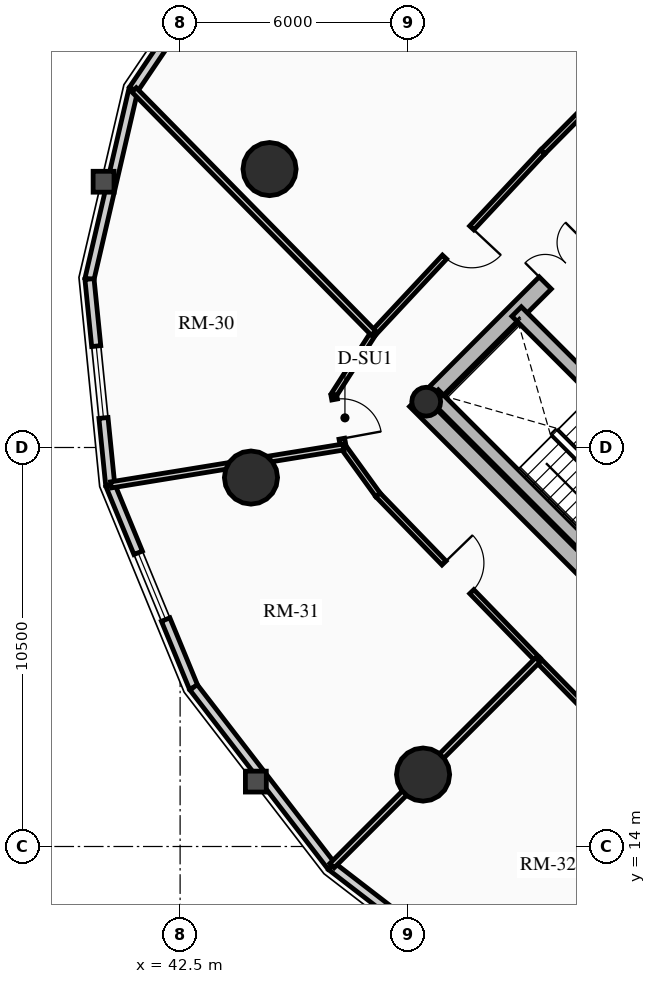
"""IFC4 building model, lengths in metres.
Left out: names, types, materials, properties, quantities, classifications, styles, units other than length and angle.
Written with IfcOpenShell. Run it as: python <this file> out.ifc"""

import sys

from ifc_helpers import new_model, si_unit, direction, frame, frame_2d, origin, origin_2d, place, context, subcontext, project, spatial, rectangle, circle, hollow_circle, extrude, source, transform, mapped, element, fill, save


model = new_model("IFC4")
c1 = context("Model", 3, precision=1e-05, world=origin(), true_north=direction((0.0, 1.0)))
c2 = subcontext(c1, "Body", "Model", "MODEL_VIEW")
j1 = project(units=[si_unit("LENGTHUNIT", "METRE"), si_unit("PLANEANGLEUNIT", "RADIAN")], contexts=[c1])
p1 = place(None, origin())
s1 = spatial("IfcSite", under=j1, at=p1, CompositionType="ELEMENT")
p2 = place(p1, origin())
s2 = spatial("IfcBuilding", under=s1, at=p2, CompositionType="ELEMENT")
p3 = place(p2, frame((0.0, 0.0, 78.88)))
s3 = spatial("IfcBuildingStorey", under=s2, at=p3, CompositionType="ELEMENT", Elevation=78.88)
p4 = place(p3, frame((58.737, 15.697, 0.0), z_axis=(0.0, 0.0, 1.0), x_axis=(-0.707106781187, 0.707106781187, 0.0)))
e1 = element("IfcWall", 1, at=p4, inside=s3, PredefinedType="SHEAR", context=c2, shape_type="SweptSolid", body=[
    extrude(rectangle(XDim=14.2, YDim=0.45, at=frame_2d((7.1, 0.0))), origin(), (0.0, 0.0, 1.0), 2.91),
])
p5 = place(p3, frame((48.856, 25.578, 0.0), z_axis=(0.0, 0.0, 1.0), x_axis=(0.707106781187, 0.707106781187, 0.0)))
e2 = element("IfcWall", 2, at=p5, inside=s3, PredefinedType="SHEAR", context=c2, shape_type="SweptSolid", body=[
    extrude(rectangle(XDim=10.7, YDim=0.45, at=frame_2d((5.35, 0.0))), origin(), (0.0, 0.0, 1.0), 2.91),
])
m1 = source(origin(), c2, "Body", "SweptSolid", [
    extrude(rectangle(XDim=1.5, YDim=2.02, at=frame_2d((0.75, 1.01))), frame((0.0, 0.235, 0.0), z_axis=(0.0, -1.0, 0.0), x_axis=(1.0, 0.0, 0.0)), (0.0, 0.0, 1.0), 0.47),
])
p6 = place(p5, frame((4.6, 0.0, 0.0)))
e3 = element("IfcOpeningElement", 3, at=p6, cuts=e2, PredefinedType="OPENING", context=c2, shape_type="MappedRepresentation", body=[
    mapped(m1, transform((0.0, 0.0, 0.0), x_axis=(1.0, 0.0, 0.0), y_axis=(0.0, 1.0, 0.0), z_axis=(0.0, 0.0, 1.0), scale=1.0)),
])
p7 = place(p3, frame((61.078, 18.355, 0.0), z_axis=(0.0, 0.0, 1.0), x_axis=(-0.707106781187, 0.707106781187, 0.0)))
e4 = element("IfcWall", 4, at=p7, inside=s3, PredefinedType="SHEAR", context=c2, shape_type="SweptSolid", body=[
    extrude(rectangle(XDim=13.75, YDim=0.35, at=frame_2d((6.875, 0.0))), origin(), (0.0, 0.0, 1.0), 2.91),
])
m2 = source(origin(), c2, "Body", "SweptSolid", [
    extrude(rectangle(XDim=1.1, YDim=2.015, at=frame_2d((0.55, 1.007))), frame((0.0, 0.185, 0.0), z_axis=(0.0, -1.0, 0.0), x_axis=(1.0, 0.0, 0.0)), (0.0, 0.0, 1.0), 0.37),
])
p8 = place(p7, frame((4.875, 0.0, 0.0)))
e5 = element("IfcOpeningElement", 5, at=p8, cuts=e4, PredefinedType="OPENING", context=c2, shape_type="MappedRepresentation", body=[
    mapped(m2, transform((0.0, 0.0, 0.0), x_axis=(1.0, 0.0, 0.0), y_axis=(0.0, 1.0, 0.0), z_axis=(0.0, 0.0, 1.0), scale=1.0)),
])
m3 = source(origin(), c2, "Body", "SweptSolid", [
    extrude(rectangle(XDim=1.15, YDim=2.02, at=frame_2d((0.575, 1.01))), frame((0.0, 0.185, 0.0), z_axis=(0.0, -1.0, 0.0), x_axis=(1.0, 0.0, 0.0)), (0.0, 0.0, 1.0), 0.37),
])
p9 = place(p7, frame((7.295, 0.0, 0.0)))
e6 = element("IfcOpeningElement", 6, at=p9, cuts=e4, PredefinedType="OPENING", context=c2, shape_type="MappedRepresentation", body=[
    mapped(m3, transform((0.0, 0.0, 0.0), x_axis=(1.0, 0.0, 0.0), y_axis=(0.0, 1.0, 0.0), z_axis=(0.0, 0.0, 1.0), scale=1.0)),
])
p10 = place(p3, frame((53.922, 21.141, 0.0), z_axis=(0.0, 0.0, 1.0), x_axis=(-0.707088616009, 0.707124945897, 0.0)))
e7 = element("IfcWall", 7, at=p10, inside=s3, PredefinedType="SHEAR", context=c2, shape_type="SweptSolid", body=[
    extrude(rectangle(XDim=6.72, YDim=0.35, at=frame_2d((3.36, 0.0))), origin(), (0.0, 0.0, 1.0), 2.91),
])
p11 = place(p3, frame((48.976, 25.706, 0.0), z_axis=(0.0, 0.0, 1.0), x_axis=(0.707106781187, 0.707106781187, 0.0)))
e8 = element("IfcColumn", 8, at=p11, inside=s3, PredefinedType="COLUMN", context=c2, shape_type="SweptSolid", body=[
    extrude(hollow_circle(Radius=0.38, WallThickness=0.032, at=origin_2d()), origin(), (0.0, 0.0, 1.0), 2.91),
])
for number, where, z_axis, x_axis in (
    (9, (44.854, 31.827, 0.0), (0.0, 0.0, 1.0), (1.0, 0.0, 0.0)),
    (10, (44.365, 23.709, 0.0), (0.0, 0.0, 1.0), (1.0, 0.0, 0.0)),
    (11, (48.893, 15.893, 0.0), (0.0, 0.0, 1.0), (1.0, 0.0, 0.0)),
):
    element("IfcColumn", number, at=place(p3, frame(where, z_axis=z_axis, x_axis=x_axis)), inside=s3, PredefinedType="USERDEFINED", context=c2, shape_type="SweptSolid", body=[
        extrude(circle(Radius=0.7, at=origin_2d()), origin(), (0.0, 0.0, 1.0), 2.91),
    ])
p12 = place(p3, frame((41.271, 33.92, 0.0), z_axis=(0.0, 0.0, 1.0), x_axis=(0.559572880421, 0.828781148131, 0.0)))
e12 = element("IfcWall", 12, at=p12, inside=s3, PredefinedType="SOLIDWALL", context=c2, shape_type="SweptSolid", body=[
    extrude(rectangle(XDim=4.905, YDim=0.24, at=frame_2d((2.452, 0.0))), origin(), (0.0, 0.0, 1.0), 2.179),
])
m4 = source(origin(), c2, "Body", "SweptSolid", [
    extrude(rectangle(XDim=1.9, YDim=1.35, at=frame_2d((0.95, 0.675))), frame((0.0, 0.13, 0.0), z_axis=(0.0, -1.0, 0.0), x_axis=(1.0, 0.0, 0.0)), (0.0, 0.0, 1.0), 0.26),
])
p13 = place(p12, frame((1.502, 0.0, 0.65)))
e13 = element("IfcOpeningElement", 13, at=p13, cuts=e12, PredefinedType="OPENING", context=c2, shape_type="MappedRepresentation", body=[
    mapped(m4, transform((0.0, 0.0, 0.0), x_axis=(1.0, 0.0, 0.0), y_axis=(0.0, 1.0, 0.0), z_axis=(0.0, 0.0, 1.0), scale=1.0)),
])
p14 = place(p3, frame((40.115, 28.933, 0.0), z_axis=(0.0, 0.0, 1.0), x_axis=(0.225834725257, 0.974165631126, 0.0)))
e14 = element("IfcWall", 14, at=p14, inside=s3, PredefinedType="SOLIDWALL", context=c2, shape_type="SweptSolid", body=[
    extrude(rectangle(XDim=5.119, YDim=0.24, at=frame_2d((2.56, 0.0))), origin(), (0.0, 0.0, 1.0), 2.179),
])
p15 = place(p3, frame((40.661, 23.513, 0.0), z_axis=(0.0, 0.0, 1.0), x_axis=(-0.10015591906, 0.994971754311, 0.0)))
e15 = element("IfcWall", 15, at=p15, inside=s3, PredefinedType="SOLIDWALL", context=c2, shape_type="SweptSolid", body=[
    extrude(rectangle(XDim=5.448, YDim=0.24, at=frame_2d((2.724, 0.0))), origin(), (0.0, 0.0, 1.0), 2.179),
])
p16 = place(p15, frame((1.774, 0.0, 0.65)))
e16 = element("IfcOpeningElement", 16, at=p16, cuts=e15, PredefinedType="OPENING", context=c2, shape_type="MappedRepresentation", body=[
    mapped(m4, transform((0.0, 0.0, 0.0), x_axis=(1.0, 0.0, 0.0), y_axis=(0.0, 1.0, 0.0), z_axis=(0.0, 0.0, 1.0), scale=1.0)),
])
p17 = place(p3, frame((42.855, 18.189, 0.0), z_axis=(0.0, 0.0, 1.0), x_axis=(-0.381027003055, 0.924563909604, 0.0)))
e17 = element("IfcWall", 17, at=p17, inside=s3, PredefinedType="SOLIDWALL", context=c2, shape_type="SweptSolid", body=[
    extrude(rectangle(XDim=5.758, YDim=0.24, at=frame_2d((2.879, 0.0))), origin(), (0.0, 0.0, 1.0), 2.179),
])
p18 = place(p17, frame((1.929, 0.0, 0.65)))
e18 = element("IfcOpeningElement", 18, at=p18, cuts=e17, PredefinedType="OPENING", context=c2, shape_type="MappedRepresentation", body=[
    mapped(m4, transform((0.0, 0.0, 0.0), x_axis=(1.0, 0.0, 0.0), y_axis=(0.0, 1.0, 0.0), z_axis=(0.0, 0.0, 1.0), scale=1.0)),
])
p19 = place(p3, frame((46.483, 13.483, 0.0), z_axis=(0.0, 0.0, 1.0), x_axis=(-0.61054437102, 0.791982052206, 0.0)))
e19 = element("IfcWall", 19, at=p19, inside=s3, PredefinedType="SOLIDWALL", context=c2, shape_type="SweptSolid", body=[
    extrude(rectangle(XDim=5.942, YDim=0.24, at=frame_2d((2.971, 0.0))), origin(), (0.0, 0.0, 1.0), 2.179),
])
p20 = place(p3, frame((51.189, 9.855, 0.0), z_axis=(0.0, 0.0, 1.0), x_axis=(-0.791982052206, 0.61054437102, 0.0)))
e20 = element("IfcWall", 20, at=p20, inside=s3, PredefinedType="SOLIDWALL", context=c2, shape_type="SweptSolid", body=[
    extrude(rectangle(XDim=5.942, YDim=0.24, at=frame_2d((2.971, 0.0))), origin(), (0.0, 0.0, 1.0), 2.179),
])
p21 = place(p20, frame((2.021, 0.0, 0.65)))
e21 = element("IfcOpeningElement", 21, at=p21, cuts=e20, PredefinedType="OPENING", context=c2, shape_type="MappedRepresentation", body=[
    mapped(m4, transform((0.0, 0.0, 0.0), x_axis=(1.0, 0.0, 0.0), y_axis=(0.0, 1.0, 0.0), z_axis=(0.0, 0.0, 1.0), scale=1.0)),
])
p22 = place(p3, frame((54.427, 34.683, 0.0), z_axis=(0.0, 0.0, 1.0), x_axis=(-0.704178989986, -0.710022499687, 0.0)))
e22 = element("IfcWall", 22, at=p22, inside=s3, PredefinedType="PARTITIONING", context=c2, shape_type="SweptSolid", body=[
    extrude(rectangle(XDim=3.384, YDim=0.15, at=frame_2d((1.692, 0.0))), origin(), (0.0, 0.0, 1.0), 2.225),
])
p23 = place(p3, frame((52.043, 32.28, 0.0), z_axis=(0.0, 0.0, 1.0), x_axis=(-0.682606081633, -0.730786519661, 0.0)))
e23 = element("IfcWall", 23, at=p23, inside=s3, PredefinedType="PARTITIONING", context=c2, shape_type="SweptSolid", body=[
    extrude(rectangle(XDim=6.527, YDim=0.15, at=frame_2d((3.263, 0.0))), origin(), (0.0, 0.0, 1.0), 2.225),
])
m5 = source(origin(), c2, "Body", "SweptSolid", [
    extrude(rectangle(XDim=1.05, YDim=2.015, at=frame_2d((0.525, 1.007))), frame((0.0, 0.085, 0.0), z_axis=(0.0, -1.0, 0.0), x_axis=(1.0, 0.0, 0.0)), (0.0, 0.0, 1.0), 0.17),
])
p24 = place(p23, frame((2.738, 0.0, 0.0)))
e24 = element("IfcOpeningElement", 24, at=p24, cuts=e23, PredefinedType="OPENING", context=c2, shape_type="MappedRepresentation", body=[
    mapped(m5, transform((0.0, 0.0, 0.0), x_axis=(1.0, 0.0, 0.0), y_axis=(0.0, 1.0, 0.0), z_axis=(0.0, 0.0, 1.0), scale=1.0)),
])
p25 = place(p3, frame((47.588, 27.51, 0.0), z_axis=(0.0, 0.0, 1.0), x_axis=(-0.540202619347, -0.841534984449, 0.0)))
e25 = element("IfcWall", 25, at=p25, inside=s3, PredefinedType="PARTITIONING", context=c2, shape_type="SweptSolid", body=[
    extrude(rectangle(XDim=1.935, YDim=0.15, at=frame_2d((0.967, 0.0))), origin(), (0.0, 0.0, 1.0), 2.225),
])
p26 = place(p3, frame((46.543, 25.882, 0.0), z_axis=(0.0, 0.0, 1.0), x_axis=(0.181153502579, -0.983454832976, 0.0)))
e26 = element("IfcWall", 26, at=p26, inside=s3, PredefinedType="PARTITIONING", context=c2, shape_type="SweptSolid", body=[
    extrude(rectangle(XDim=1.392, YDim=0.15, at=frame_2d((0.696, 0.0))), origin(), (0.0, 0.0, 1.0), 2.225),
])
p27 = place(p26, frame((0.12, 0.0, 0.0)))
e27 = element("IfcOpeningElement", 27, at=p27, cuts=e26, PredefinedType="OPENING", context=c2, shape_type="MappedRepresentation", body=[
    mapped(m5, transform((0.0, 0.0, 0.0), x_axis=(1.0, 0.0, 0.0), y_axis=(0.0, 1.0, 0.0), z_axis=(0.0, 0.0, 1.0), scale=1.0)),
])
p28 = place(p3, frame((46.795, 24.513, 0.0), z_axis=(0.0, 0.0, 1.0), x_axis=(0.585628197524, -0.810579801294, 0.0)))
e28 = element("IfcWall", 28, at=p28, inside=s3, PredefinedType="PARTITIONING", context=c2, shape_type="SweptSolid", body=[
    extrude(rectangle(XDim=1.554, YDim=0.15, at=frame_2d((0.777, 0.0))), origin(), (0.0, 0.0, 1.0), 2.225),
])
p29 = place(p3, frame((47.706, 23.253, 0.0), z_axis=(0.0, 0.0, 1.0), x_axis=(0.696179266346, -0.717867974707, 0.0)))
e29 = element("IfcWall", 29, at=p29, inside=s3, PredefinedType="PARTITIONING", context=c2, shape_type="SweptSolid", body=[
    extrude(rectangle(XDim=6.045, YDim=0.15, at=frame_2d((3.022, 0.0))), origin(), (0.0, 0.0, 1.0), 2.655),
])
p30 = place(p29, frame((2.497, 0.0, 0.0)))
e30 = element("IfcOpeningElement", 30, at=p30, cuts=e29, PredefinedType="OPENING", context=c2, shape_type="MappedRepresentation", body=[
    mapped(m5, transform((0.0, 0.0, 0.0), x_axis=(1.0, 0.0, 0.0), y_axis=(0.0, 1.0, 0.0), z_axis=(0.0, 0.0, 1.0), scale=1.0)),
])
p31 = place(p3, frame((51.914, 18.914, 0.0), z_axis=(0.0, 0.0, 1.0), x_axis=(0.699999313799, -0.714143515465, 0.0)))
e31 = element("IfcWall", 31, at=p31, inside=s3, PredefinedType="PARTITIONING", context=c2, shape_type="SweptSolid", body=[
    extrude(rectangle(XDim=6.162, YDim=0.15, at=frame_2d((3.081, 0.0))), origin(), (0.0, 0.0, 1.0), 2.225),
])
p32 = place(p3, frame((54.427, 34.683, 0.0), z_axis=(0.0, 0.0, 1.0), x_axis=(-0.72454072322, 0.689231993161, 0.0)))
e32 = element("IfcWall", 32, at=p32, inside=s3, PredefinedType="PARTITIONING", context=c2, shape_type="SweptSolid", body=[
    extrude(rectangle(XDim=8.747, YDim=0.16, at=frame_2d((4.374, 0.0))), origin(), (0.0, 0.0, 1.0), 2.179),
])
p33 = place(p3, frame((47.588, 27.51, 0.0), z_axis=(0.0, 0.0, 1.0), x_axis=(-0.701457073903, 0.712711704318, 0.0)))
e33 = element("IfcWall", 33, at=p33, inside=s3, PredefinedType="PARTITIONING", context=c2, shape_type="SweptSolid", body=[
    extrude(rectangle(XDim=8.981, YDim=0.16, at=frame_2d((4.49, 0.0))), origin(), (0.0, 0.0, 1.0), 2.179),
])
p34 = place(p3, frame((46.795, 24.513, 0.0), z_axis=(0.0, 0.0, 1.0), x_axis=(-0.986966109862, -0.160928238618, 0.0)))
e34 = element("IfcWall", 34, at=p34, inside=s3, PredefinedType="PARTITIONING", context=c2, shape_type="SweptSolid", body=[
    extrude(rectangle(XDim=6.196, YDim=0.16, at=frame_2d((3.098, 0.0))), origin(), (0.0, 0.0, 1.0), 2.179),
])
p35 = place(p3, frame((51.914, 18.914, 0.0), z_axis=(0.0, 0.0, 1.0), x_axis=(-0.707106781187, -0.707106781187, 0.0)))
e35 = element("IfcWall", 35, at=p35, inside=s3, PredefinedType="PARTITIONING", context=c2, shape_type="SweptSolid", body=[
    extrude(rectangle(XDim=7.661, YDim=0.16, at=frame_2d((3.831, 0.0))), origin(), (0.0, 0.0, 1.0), 2.179),
])
m6 = source(origin(), c2, "Body", "SweptSolid", [
    extrude(rectangle(XDim=1.9, YDim=1.35, at=frame_2d((0.95, 0.675))), frame((0.0, 0.03, 0.0), z_axis=(0.0, -1.0, 0.0), x_axis=(1.0, 0.0, 0.0)), (0.0, 0.0, 1.0), 0.06),
])
p36 = place(p16, origin())
e36 = element("IfcWindow", 36, at=p36, inside=s3, PartitioningType="DOUBLE_PANEL_VERTICAL", PredefinedType="WINDOW", context=c2, shape_type="MappedRepresentation", body=[
    mapped(m6, transform((0.0, 0.0, 0.0), x_axis=(1.0, 0.0, 0.0), y_axis=(0.0, 1.0, 0.0), z_axis=(0.0, 0.0, 1.0), scale=1.0)),
])
fill(e16, e36)
p37 = place(p18, origin())
e37 = element("IfcWindow", 37, at=p37, inside=s3, PartitioningType="DOUBLE_PANEL_VERTICAL", PredefinedType="WINDOW", context=c2, shape_type="MappedRepresentation", body=[
    mapped(m6, transform((0.0, 0.0, 0.0), x_axis=(1.0, 0.0, 0.0), y_axis=(0.0, 1.0, 0.0), z_axis=(0.0, 0.0, 1.0), scale=1.0)),
])
fill(e18, e37)
m7 = source(origin(), c2, "Body", "SweptSolid", [
    extrude(rectangle(XDim=1.5, YDim=2.02, at=frame_2d((0.75, 1.01))), frame((0.0, 0.025, 0.0), z_axis=(0.0, -1.0, 0.0), x_axis=(1.0, 0.0, 0.0)), (0.0, 0.0, 1.0), 0.05),
])
p38 = place(p6, origin())
e38 = element("IfcDoor", 38, at=p38, inside=s3, OperationType="DOUBLE_DOOR_SINGLE_SWING", PredefinedType="DOOR", context=c2, shape_type="MappedRepresentation", body=[
    mapped(m7, transform((0.0, 0.0, 0.0), x_axis=(1.0, 0.0, 0.0), y_axis=(0.0, 1.0, 0.0), z_axis=(0.0, 0.0, 1.0), scale=1.0)),
])
fill(e3, e38)
m8 = source(origin(), c2, "Body", "SweptSolid", [
    extrude(rectangle(XDim=1.05, YDim=2.015, at=frame_2d((0.525, 1.007))), frame((0.0, 0.025, 0.0), z_axis=(0.0, -1.0, 0.0), x_axis=(1.0, 0.0, 0.0)), (0.0, 0.0, 1.0), 0.05),
])
p39 = place(p24, origin())
e39 = element("IfcDoor", 39, at=p39, inside=s3, OperationType="SINGLE_SWING_LEFT", PredefinedType="DOOR", context=c2, shape_type="MappedRepresentation", body=[
    mapped(m8, transform((0.0, 0.0, 0.0), x_axis=(1.0, 0.0, 0.0), y_axis=(0.0, 1.0, 0.0), z_axis=(0.0, 0.0, 1.0), scale=1.0)),
])
fill(e24, e39)
p40 = place(p27, origin())
e40 = element("IfcDoor", 40, at=p40, inside=s3, OperationType="SINGLE_SWING_RIGHT", PredefinedType="DOOR", context=c2, shape_type="MappedRepresentation", body=[
    mapped(m8, transform((0.0, 0.0, 0.0), x_axis=(1.0, 0.0, 0.0), y_axis=(0.0, 1.0, 0.0), z_axis=(0.0, 0.0, 1.0), scale=1.0)),
])
fill(e27, e40)
p41 = place(p30, origin())
e41 = element("IfcDoor", 41, at=p41, inside=s3, OperationType="SINGLE_SWING_LEFT", PredefinedType="DOOR", context=c2, shape_type="MappedRepresentation", body=[
    mapped(m8, transform((0.0, 0.0, 0.0), x_axis=(1.0, 0.0, 0.0), y_axis=(0.0, 1.0, 0.0), z_axis=(0.0, 0.0, 1.0), scale=1.0)),
])
fill(e30, e41)
save(model, sys.argv[1])
